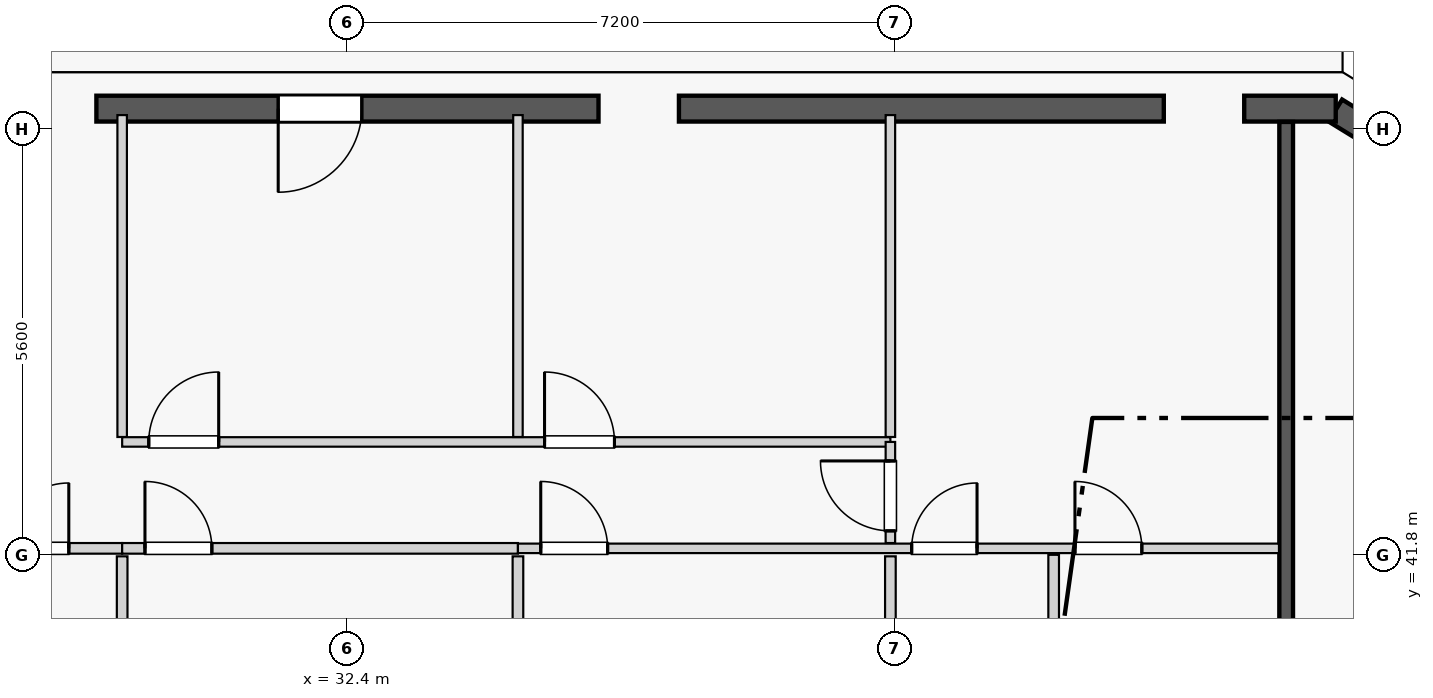
"""IFC4 building model, lengths in metres.
Left out: names, types, materials, properties, quantities, classifications, styles, units other than length and angle.
Written with IfcOpenShell. Run it as: python <this file> out.ifc"""

import sys

from ifc_helpers import new_model, si_unit, direction, frame, frame_2d, origin, origin_2d, place, context, subcontext, project, spatial, rectangle, extrude, element, fill, save


model = new_model("IFC4")
c1 = context("Model", 3, precision=1e-05, world=origin(), true_north=direction((0.0, 1.0)))
c2 = subcontext(c1, "Body", "Model", "MODEL_VIEW")
j1 = project(units=[si_unit("LENGTHUNIT", "METRE"), si_unit("PLANEANGLEUNIT", "RADIAN")], contexts=[c1])
p1 = place(None, origin())
s1 = spatial("IfcSite", under=j1, at=p1, CompositionType="ELEMENT")
p2 = place(p1, origin())
s2 = spatial("IfcBuilding", under=s1, at=p2, CompositionType="ELEMENT")
p3 = place(p2, frame((0.0, 0.0, 112.6)))
s3 = spatial("IfcBuildingStorey", under=s2, at=p3, CompositionType="ELEMENT", Elevation=112.6)
for number, where, z_axis, x_axis in (
    (1, (43.669, 47.661, 0.0), (0.0, 0.0, 1.0), (1.0, 0.0, 0.0)),
    (2, (36.232, 47.608, 0.0), (0.0, 0.0, 1.0), (1.0, 0.0, 0.0)),
    (3, (28.568, 47.608, 0.0), (0.0, 0.0, 1.0), (1.0, 0.0, 0.0)),
):
    element("IfcColumn", number, at=place(p3, frame(where, z_axis=z_axis, x_axis=x_axis)), inside=s3, PredefinedType="COLUMN", context=c2, shape_type="SweptSolid", body=[
        extrude(rectangle(XDim=1.05, YDim=1.05, at=origin_2d()), origin(), (0.0, 0.0, 1.0), 3.55),
    ])
p4 = place(p3, frame((45.659, 46.508, 0.0), z_axis=(0.0, 0.0, 1.0), x_axis=(-0.865160173452, 0.501495637342, 0.0)))
e4 = element("IfcColumn", 4, at=p4, inside=s3, PredefinedType="PILASTER", context=c2, shape_type="SweptSolid", body=[
    extrude(rectangle(XDim=0.5, YDim=0.35, at=origin_2d()), origin(), (0.0, 0.0, 1.0), 3.55),
])
p5 = place(p3, frame((46.971, 46.677, 0.0), z_axis=(0.0, 0.0, 1.0), x_axis=(-0.851798915137, 0.523868884523, 0.0)))
e5 = element("IfcWall", 5, at=p5, inside=s3, PredefinedType="STANDARD", context=c2, shape_type="SweptSolid", body=[
    extrude(rectangle(XDim=1.848, YDim=0.34, at=frame_2d((0.924, 0.0))), origin(), (0.0, 0.0, 1.0), 3.34),
])
p6 = place(p3, frame((45.402, 47.67, 0.0), z_axis=(0.0, 0.0, 1.0), x_axis=(-1.0, 0.0, 0.0)))
e6 = element("IfcWall", 6, at=p6, inside=s3, PredefinedType="STANDARD", context=c2, shape_type="SweptSolid", body=[
    extrude(rectangle(XDim=1.204, YDim=0.34, at=frame_2d((0.602, 0.0))), origin(), (0.0, 0.0, 1.0), 3.34),
])
p7 = place(p3, frame((43.14, 47.67, 0.0), z_axis=(0.0, 0.0, 1.0), x_axis=(-1.0, 0.0, 0.0)))
e7 = element("IfcWall", 7, at=p7, inside=s3, PredefinedType="STANDARD", context=c2, shape_type="SweptSolid", body=[
    extrude(rectangle(XDim=6.379, YDim=0.34, at=frame_2d((3.189, 0.0))), origin(), (0.0, 0.0, 1.0), 2.797),
])
p8 = place(p7, frame((1.192, 0.0, 0.75)))
e8 = element("IfcOpeningElement", 8, at=p8, cuts=e7, PredefinedType="OPENING", context=c2, shape_type="SweptSolid", body=[
    extrude(rectangle(XDim=1.1, YDim=1.897, at=frame_2d((0.55, 0.948))), frame((0.0, 0.18, 0.0), z_axis=(0.0, -1.0, 0.0), x_axis=(1.0, 0.0, 0.0)), (0.0, 0.0, 1.0), 0.36),
])
p9 = place(p7, frame((4.494, 0.0, 0.75)))
e9 = element("IfcOpeningElement", 9, at=p9, cuts=e7, PredefinedType="OPENING", context=c2, shape_type="SweptSolid", body=[
    extrude(rectangle(XDim=1.1, YDim=1.897, at=frame_2d((0.55, 0.948))), frame((0.0, 0.18, 0.0), z_axis=(0.0, -1.0, 0.0), x_axis=(1.0, 0.0, 0.0)), (0.0, 0.0, 1.0), 0.36),
])
p10 = place(p3, frame((35.703, 47.67, 0.0), z_axis=(0.0, 0.0, 1.0), x_axis=(-1.0, 0.0, 0.0)))
e10 = element("IfcWall", 10, at=p10, inside=s3, PredefinedType="STANDARD", context=c2, shape_type="SweptSolid", body=[
    extrude(rectangle(XDim=6.606, YDim=0.34, at=frame_2d((3.303, 0.0))), origin(), (0.0, 0.0, 1.0), 2.797),
])
p11 = place(p10, frame((3.114, 0.0, 0.0)))
e11 = element("IfcOpeningElement", 11, at=p11, cuts=e10, PredefinedType="OPENING", context=c2, shape_type="SweptSolid", body=[
    extrude(rectangle(XDim=1.1, YDim=2.25, at=frame_2d((0.55, 1.125))), frame((0.0, 0.18, 0.0), z_axis=(0.0, -1.0, 0.0), x_axis=(1.0, 0.0, 0.0)), (0.0, 0.0, 1.0), 0.36),
])
p12 = place(p3, frame((44.75, 35.3, 0.0), z_axis=(0.0, 0.0, 1.0), x_axis=(0.0, 1.0, 0.0)))
e12 = element("IfcWall", 12, at=p12, inside=s3, PredefinedType="PARTITIONING", context=c2, shape_type="SweptSolid", body=[
    extrude(rectangle(XDim=12.195, YDim=0.18, at=frame_2d((6.098, 0.0))), origin(), (0.0, 0.0, 1.0), 3.34),
])
p13 = place(p3, frame((22.1, 41.885, 0.0), z_axis=(0.0, 0.0, 1.0), x_axis=(1.0, 0.0, 0.0)))
e13 = element("IfcWall", 13, at=p13, inside=s3, PredefinedType="PLUMBINGWALL", context=c2, shape_type="SweptSolid", body=[
    extrude(rectangle(XDim=7.336, YDim=0.14, at=frame_2d((3.668, 0.0))), origin(), (0.0, 0.0, 1.0), 3.34),
])
p14 = place(p13, frame((5.774, 0.0, 0.0)))
e14 = element("IfcOpeningElement", 14, at=p14, cuts=e13, PredefinedType="OPENING", context=c2, shape_type="SweptSolid", body=[
    extrude(rectangle(XDim=0.86, YDim=2.1, at=frame_2d((0.43, 1.05))), frame((0.0, 0.08, 0.0), z_axis=(0.0, -1.0, 0.0), x_axis=(1.0, 0.0, 0.0)), (0.0, 0.0, 1.0), 0.16),
])
p15 = place(p13, frame((0.26, 0.0, 0.0)))
e15 = element("IfcOpeningElement", 15, at=p15, cuts=e13, PredefinedType="OPENING", context=c2, shape_type="SweptSolid", body=[
    extrude(rectangle(XDim=0.88, YDim=2.15, at=frame_2d((0.44, 1.075))), frame((0.0, 0.08, 0.0), z_axis=(0.0, -1.0, 0.0), x_axis=(1.0, 0.0, 0.0)), (0.0, 0.0, 1.0), 0.16),
])
p16 = place(p13, frame((3.485, 0.0, 0.0)))
e16 = element("IfcOpeningElement", 16, at=p16, cuts=e13, PredefinedType="OPENING", context=c2, shape_type="SweptSolid", body=[
    extrude(rectangle(XDim=0.88, YDim=2.15, at=frame_2d((0.44, 1.075))), frame((0.0, 0.08, 0.0), z_axis=(0.0, -1.0, 0.0), x_axis=(1.0, 0.0, 0.0)), (0.0, 0.0, 1.0), 0.16),
])
p17 = place(p3, frame((29.436, 41.885, 0.0), z_axis=(0.0, 0.0, 1.0), x_axis=(1.0, 0.0, 0.0)))
e17 = element("IfcWall", 17, at=p17, inside=s3, PredefinedType="PLUMBINGWALL", context=c2, shape_type="SweptSolid", body=[
    extrude(rectangle(XDim=5.207, YDim=0.14, at=frame_2d((2.604, 0.0))), origin(), (0.0, 0.0, 1.0), 3.34),
])
p18 = place(p17, frame((0.3, 0.0, 0.0)))
e18 = element("IfcOpeningElement", 18, at=p18, cuts=e17, PredefinedType="OPENING", context=c2, shape_type="SweptSolid", body=[
    extrude(rectangle(XDim=0.88, YDim=2.15, at=frame_2d((0.44, 1.075))), frame((0.0, 0.08, 0.0), z_axis=(0.0, -1.0, 0.0), x_axis=(1.0, 0.0, 0.0)), (0.0, 0.0, 1.0), 0.16),
])
p19 = place(p3, frame((34.643, 41.885, 0.0), z_axis=(0.0, 0.0, 1.0), x_axis=(1.0, 0.0, 0.0)))
e19 = element("IfcWall", 19, at=p19, inside=s3, PredefinedType="PARTITIONING", context=c2, shape_type="SweptSolid", body=[
    extrude(rectangle(XDim=10.012, YDim=0.125, at=frame_2d((5.006, 0.0))), origin(), (0.0, 0.0, 1.0), 3.34),
])
p20 = place(p19, frame((5.18, 0.0, 0.0)))
e20 = element("IfcOpeningElement", 20, at=p20, cuts=e19, PredefinedType="OPENING", context=c2, shape_type="SweptSolid", body=[
    extrude(rectangle(XDim=0.86, YDim=2.1, at=frame_2d((0.43, 1.05))), frame((0.0, 0.073, 0.0), z_axis=(0.0, -1.0, 0.0), x_axis=(1.0, 0.0, 0.0)), (0.0, 0.0, 1.0), 0.145),
])
p21 = place(p19, frame((7.328, 0.0, 0.0)))
e21 = element("IfcOpeningElement", 21, at=p21, cuts=e19, PredefinedType="OPENING", context=c2, shape_type="SweptSolid", body=[
    extrude(rectangle(XDim=0.88, YDim=2.15, at=frame_2d((0.44, 1.075))), frame((0.0, 0.073, 0.0), z_axis=(0.0, -1.0, 0.0), x_axis=(1.0, 0.0, 0.0)), (0.0, 0.0, 1.0), 0.145),
])
p22 = place(p19, frame((0.3, 0.0, 0.0)))
e22 = element("IfcOpeningElement", 22, at=p22, cuts=e19, PredefinedType="OPENING", context=c2, shape_type="SweptSolid", body=[
    extrude(rectangle(XDim=0.88, YDim=2.15, at=frame_2d((0.44, 1.075))), frame((0.0, 0.073, 0.0), z_axis=(0.0, -1.0, 0.0), x_axis=(1.0, 0.0, 0.0)), (0.0, 0.0, 1.0), 0.145),
])
p23 = place(p3, frame((29.436, 43.35, 0.0), z_axis=(0.0, 0.0, 1.0), x_axis=(0.0, 1.0, 0.0)))
e23 = element("IfcWall", 23, at=p23, inside=s3, PredefinedType="PARTITIONING", context=c2, shape_type="SweptSolid", body=[
    extrude(rectangle(XDim=4.235, YDim=0.125, at=frame_2d((2.117, 0.0))), origin(), (0.0, 0.0, 1.0), 3.34),
])
p24 = place(p3, frame((29.436, 43.285, 0.0), z_axis=(0.0, 0.0, 1.0), x_axis=(1.0, 0.0, 0.0)))
e24 = element("IfcWall", 24, at=p24, inside=s3, PredefinedType="PARTITIONING", context=c2, shape_type="SweptSolid", body=[
    extrude(rectangle(XDim=10.107, YDim=0.125, at=frame_2d((5.053, 0.0))), origin(), (0.0, 0.0, 1.0), 3.34),
])
p25 = place(p24, frame((0.35, 0.0, 0.0)))
e25 = element("IfcOpeningElement", 25, at=p25, cuts=e24, PredefinedType="OPENING", context=c2, shape_type="SweptSolid", body=[
    extrude(rectangle(XDim=0.92, YDim=2.15, at=frame_2d((0.46, 1.075))), frame((0.0, 0.073, 0.0), z_axis=(0.0, -1.0, 0.0), x_axis=(1.0, 0.0, 0.0)), (0.0, 0.0, 1.0), 0.145),
])
p26 = place(p24, frame((5.557, 0.0, 0.0)))
e26 = element("IfcOpeningElement", 26, at=p26, cuts=e24, PredefinedType="OPENING", context=c2, shape_type="SweptSolid", body=[
    extrude(rectangle(XDim=0.92, YDim=2.15, at=frame_2d((0.46, 1.075))), frame((0.0, 0.073, 0.0), z_axis=(0.0, -1.0, 0.0), x_axis=(1.0, 0.0, 0.0)), (0.0, 0.0, 1.0), 0.145),
])
p27 = place(p3, frame((39.543, 41.955, 0.0), z_axis=(0.0, 0.0, 1.0), x_axis=(0.0, 1.0, 0.0)))
e27 = element("IfcWall", 27, at=p27, inside=s3, PredefinedType="PARTITIONING", context=c2, shape_type="SweptSolid", body=[
    extrude(rectangle(XDim=1.33, YDim=0.125, at=frame_2d((0.665, 0.0))), origin(), (0.0, 0.0, 1.0), 3.34),
])
p28 = place(p27, frame((0.16, 0.0, 0.0)))
e28 = element("IfcOpeningElement", 28, at=p28, cuts=e27, PredefinedType="OPENING", context=c2, shape_type="SweptSolid", body=[
    extrude(rectangle(XDim=0.92, YDim=2.15, at=frame_2d((0.46, 1.075))), frame((0.0, 0.073, 0.0), z_axis=(0.0, -1.0, 0.0), x_axis=(1.0, 0.0, 0.0)), (0.0, 0.0, 1.0), 0.145),
])
for number, where, z_axis, x_axis in (
    (29, (29.436, 35.385, 0.0), (0.0, 0.0, 1.0), (0.0, 1.0, 0.0)),
    (30, (34.643, 35.385, 0.0), (0.0, 0.0, 1.0), (0.0, 1.0, 0.0)),
):
    element("IfcWall", number, at=place(p3, frame(where, z_axis=z_axis, x_axis=x_axis)), inside=s3, PredefinedType="PLUMBINGWALL", context=c2, shape_type="SweptSolid", body=[
        extrude(rectangle(XDim=6.395, YDim=0.14, at=frame_2d((3.198, 0.0))), origin(), (0.0, 0.0, 1.0), 3.34),
    ])
for number, where, z_axis, x_axis in (
    (31, (34.643, 43.35, 0.0), (0.0, 0.0, 1.0), (0.0, 1.0, 0.0)),
    (32, (39.543, 43.35, 0.0), (0.0, 0.0, 1.0), (0.0, 1.0, 0.0)),
):
    element("IfcWall", number, at=place(p3, frame(where, z_axis=z_axis, x_axis=x_axis)), inside=s3, PredefinedType="PARTITIONING", context=c2, shape_type="SweptSolid", body=[
        extrude(rectangle(XDim=4.235, YDim=0.125, at=frame_2d((2.117, 0.0))), origin(), (0.0, 0.0, 1.0), 3.34),
    ])
p29 = place(p3, frame((39.543, 35.385, 0.0), z_axis=(0.0, 0.0, 1.0), x_axis=(0.0, 1.0, 0.0)))
e33 = element("IfcWall", 33, at=p29, inside=s3, PredefinedType="PLUMBINGWALL", context=c2, shape_type="SweptSolid", body=[
    extrude(rectangle(XDim=6.395, YDim=0.14, at=frame_2d((3.198, 0.0))), origin(), (0.0, 0.0, 1.0), 3.34),
])
p30 = place(p3, frame((41.691, 35.385, 0.0), z_axis=(0.0, 0.0, 1.0), x_axis=(0.0, 1.0, 0.0)))
e34 = element("IfcWall", 34, at=p30, inside=s3, PredefinedType="PLUMBINGWALL", context=c2, shape_type="SweptSolid", body=[
    extrude(rectangle(XDim=6.415, YDim=0.14, at=frame_2d((3.208, 0.0))), origin(), (0.0, 0.0, 1.0), 2.722),
])
p31 = place(p8, origin())
e35 = element("IfcWindow", 35, at=p31, inside=s3, PartitioningType="SINGLE_PANEL", PredefinedType="WINDOW", context=c2, shape_type="SweptSolid", body=[
    extrude(rectangle(XDim=1.1, YDim=1.897, at=frame_2d((0.55, 0.948))), frame((0.0, 0.03, 0.0), z_axis=(0.0, -1.0, 0.0), x_axis=(1.0, 0.0, 0.0)), (0.0, 0.0, 1.0), 0.06),
])
fill(e8, e35)
p32 = place(p11, origin())
e36 = element("IfcDoor", 36, at=p32, inside=s3, OperationType="SINGLE_SWING_RIGHT", PredefinedType="DOOR", context=c2, shape_type="SweptSolid", body=[
    extrude(rectangle(XDim=1.1, YDim=2.25, at=frame_2d((0.55, 1.125))), frame((0.0, 0.025, 0.0), z_axis=(0.0, -1.0, 0.0), x_axis=(1.0, 0.0, 0.0)), (0.0, 0.0, 1.0), 0.05),
])
fill(e11, e36)
p33 = place(p14, origin())
e37 = element("IfcDoor", 37, at=p33, inside=s3, OperationType="SINGLE_SWING_RIGHT", PredefinedType="DOOR", context=c2, shape_type="SweptSolid", body=[
    extrude(rectangle(XDim=0.86, YDim=2.1, at=frame_2d((0.43, 1.05))), frame((0.0, 0.025, 0.0), z_axis=(0.0, -1.0, 0.0), x_axis=(1.0, 0.0, 0.0)), (0.0, 0.0, 1.0), 0.05),
])
fill(e14, e37)
p34 = place(p20, origin())
e38 = element("IfcDoor", 38, at=p34, inside=s3, OperationType="SINGLE_SWING_RIGHT", PredefinedType="DOOR", context=c2, shape_type="SweptSolid", body=[
    extrude(rectangle(XDim=0.86, YDim=2.1, at=frame_2d((0.43, 1.05))), frame((0.0, 0.025, 0.0), z_axis=(0.0, -1.0, 0.0), x_axis=(1.0, 0.0, 0.0)), (0.0, 0.0, 1.0), 0.05),
])
fill(e20, e38)
p35 = place(p21, origin())
e39 = element("IfcDoor", 39, at=p35, inside=s3, OperationType="SINGLE_SWING_LEFT", PredefinedType="DOOR", context=c2, shape_type="SweptSolid", body=[
    extrude(rectangle(XDim=0.88, YDim=2.15, at=frame_2d((0.44, 1.075))), frame((0.0, 0.025, 0.0), z_axis=(0.0, -1.0, 0.0), x_axis=(1.0, 0.0, 0.0)), (0.0, 0.0, 1.0), 0.05),
])
fill(e21, e39)
p36 = place(p18, origin())
e40 = element("IfcDoor", 40, at=p36, inside=s3, OperationType="SINGLE_SWING_LEFT", PredefinedType="DOOR", context=c2, shape_type="SweptSolid", body=[
    extrude(rectangle(XDim=0.88, YDim=2.15, at=frame_2d((0.44, 1.075))), frame((0.0, 0.025, 0.0), z_axis=(0.0, -1.0, 0.0), x_axis=(1.0, 0.0, 0.0)), (0.0, 0.0, 1.0), 0.05),
])
fill(e18, e40)
p37 = place(p25, origin())
e41 = element("IfcDoor", 41, at=p37, inside=s3, OperationType="SINGLE_SWING_RIGHT", PredefinedType="DOOR", context=c2, shape_type="SweptSolid", body=[
    extrude(rectangle(XDim=0.92, YDim=2.15, at=frame_2d((0.46, 1.075))), frame((0.0, 0.025, 0.0), z_axis=(0.0, -1.0, 0.0), x_axis=(1.0, 0.0, 0.0)), (0.0, 0.0, 1.0), 0.05),
])
fill(e25, e41)
p38 = place(p26, origin())
e42 = element("IfcDoor", 42, at=p38, inside=s3, OperationType="SINGLE_SWING_LEFT", PredefinedType="DOOR", context=c2, shape_type="SweptSolid", body=[
    extrude(rectangle(XDim=0.92, YDim=2.15, at=frame_2d((0.46, 1.075))), frame((0.0, 0.025, 0.0), z_axis=(0.0, -1.0, 0.0), x_axis=(1.0, 0.0, 0.0)), (0.0, 0.0, 1.0), 0.05),
])
fill(e26, e42)
p39 = place(p28, origin())
e43 = element("IfcDoor", 43, at=p39, inside=s3, OperationType="SINGLE_SWING_RIGHT", PredefinedType="DOOR", context=c2, shape_type="SweptSolid", body=[
    extrude(rectangle(XDim=0.92, YDim=2.15, at=frame_2d((0.46, 1.075))), frame((0.0, 0.025, 0.0), z_axis=(0.0, -1.0, 0.0), x_axis=(1.0, 0.0, 0.0)), (0.0, 0.0, 1.0), 0.05),
])
fill(e28, e43)
p40 = place(p22, origin())
e44 = element("IfcDoor", 44, at=p40, inside=s3, OperationType="SINGLE_SWING_LEFT", PredefinedType="DOOR", context=c2, shape_type="SweptSolid", body=[
    extrude(rectangle(XDim=0.88, YDim=2.15, at=frame_2d((0.44, 1.075))), frame((0.0, 0.025, 0.0), z_axis=(0.0, -1.0, 0.0), x_axis=(1.0, 0.0, 0.0)), (0.0, 0.0, 1.0), 0.05),
])
fill(e22, e44)
p41 = place(p9, origin())
e45 = element("IfcWindow", 45, at=p41, inside=s3, PartitioningType="SINGLE_PANEL", PredefinedType="WINDOW", context=c2, shape_type="SweptSolid", body=[
    extrude(rectangle(XDim=1.1, YDim=1.897, at=frame_2d((0.55, 0.948))), frame((0.0, 0.03, 0.0), z_axis=(0.0, -1.0, 0.0), x_axis=(1.0, 0.0, 0.0)), (0.0, 0.0, 1.0), 0.06),
])
fill(e9, e45)
save(model, sys.argv[1])
